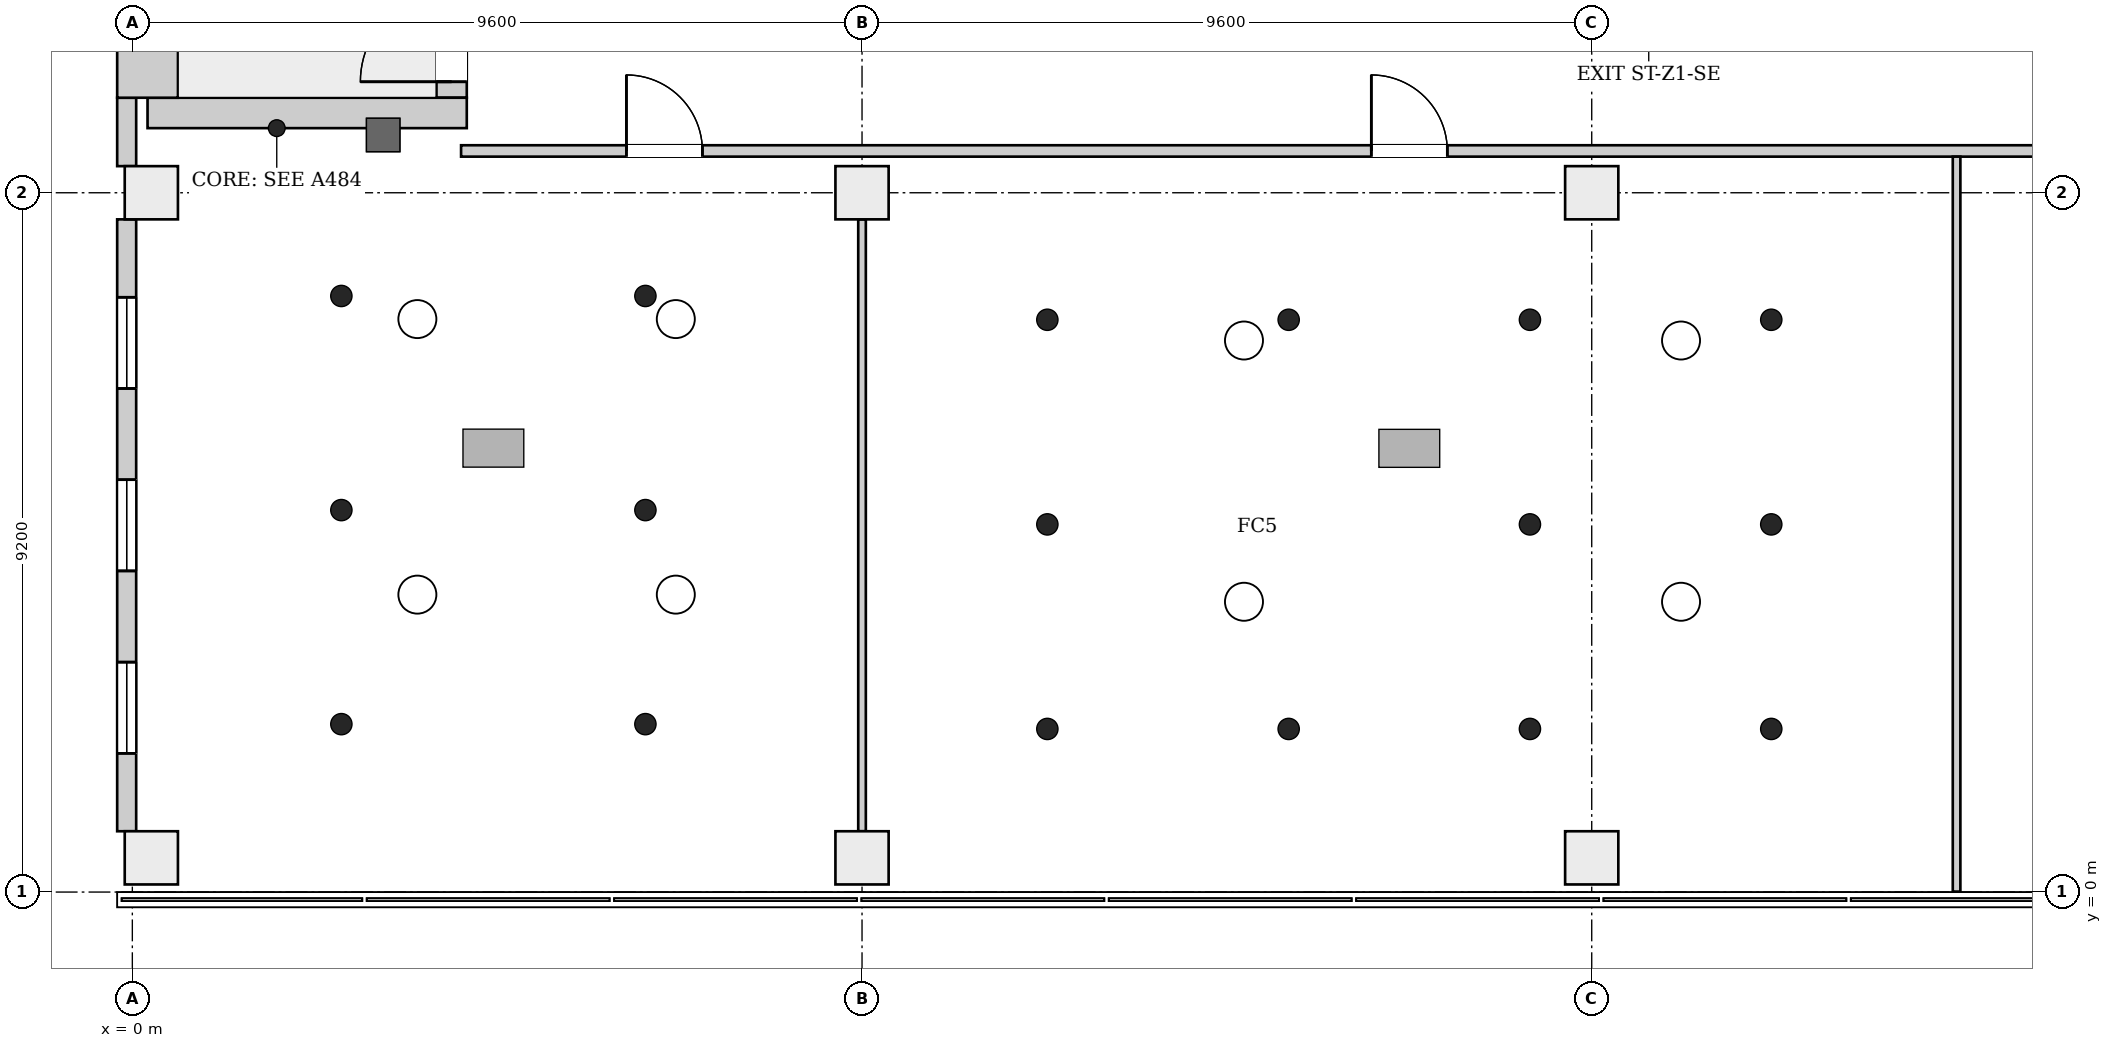
"""IFC4 building model, lengths in metres.
Left out: names, types, materials, properties, quantities, classifications, styles, units other than length and angle.
Written with IfcOpenShell. Run it as: python <this file> out.ifc"""

import sys

from ifc_helpers import new_model, si_unit, direction, frame, frame_2d, origin, origin_2d, place, context, subcontext, project, spatial, rectangle, extrude, element, fill, save


model = new_model("IFC4")
c1 = context("Model", 3, precision=1e-05, world=origin(), true_north=direction((0.0, 1.0)))
c2 = subcontext(c1, "Body", "Model", "MODEL_VIEW")
j1 = project(units=[si_unit("LENGTHUNIT", "METRE"), si_unit("PLANEANGLEUNIT", "RADIAN")], contexts=[c1])
p1 = place(None, origin())
s1 = spatial("IfcSite", under=j1, at=p1, CompositionType="ELEMENT")
p2 = place(p1, origin())
s2 = spatial("IfcBuilding", under=s1, at=p2, CompositionType="ELEMENT")
p3 = place(p2, frame((0.0, 0.0, 69.7)))
s3 = spatial("IfcBuildingStorey", under=s2, at=p3, CompositionType="ELEMENT", Elevation=69.7)
p4 = place(p3, frame((0.2, 10.25, 0.0), z_axis=(0.0, 0.0, 1.0), x_axis=(1.0, 0.0, 0.0)))
e1 = element("IfcWall", 1, at=p4, inside=s3, PredefinedType="SHEAR", context=c2, shape_type="SweptSolid", body=[
    extrude(rectangle(XDim=4.2, YDim=0.4, at=frame_2d((2.1, 0.0))), origin(), (0.0, 0.0, 1.0), 4.2),
])
p5 = place(p3, frame((0.2, 10.45, 0.0), z_axis=(0.0, 0.0, 1.0), x_axis=(0.0, 1.0, 0.0)))
e2 = element("IfcWall", 2, at=p5, inside=s3, PredefinedType="SHEAR", context=c2, shape_type="SweptSolid", body=[
    extrude(rectangle(XDim=6.6, YDim=0.8, at=frame_2d((3.3, 0.0))), origin(), (0.0, 0.0, 1.0), 4.2),
])
p6 = place(p3, frame((4.2, 10.45, 0.0), z_axis=(0.0, 0.0, 1.0), x_axis=(0.0, 1.0, 0.0)))
e3 = element("IfcWall", 3, at=p6, inside=s3, PredefinedType="SHEAR", context=c2, shape_type="SweptSolid", body=[
    extrude(rectangle(XDim=6.6, YDim=0.4, at=frame_2d((3.3, 0.0))), origin(), (0.0, 0.0, 1.0), 4.2),
])
p7 = place(p6, frame((0.21, 0.0, 0.0)))
e4 = element("IfcOpeningElement", 4, at=p7, cuts=e3, PredefinedType="OPENING", context=c2, shape_type="SweptSolid", body=[
    extrude(rectangle(XDim=1.2, YDim=2.1, at=frame_2d((0.6, 1.05))), frame((0.0, 0.21, 0.0), z_axis=(0.0, -1.0, 0.0), x_axis=(1.0, 0.0, 0.0)), (0.0, 0.0, 1.0), 0.42),
])
for number, where, z_axis, x_axis in (
    (5, (0.25, 0.45, 0.0), (0.0, 0.0, 1.0), (1.0, 0.0, 0.0)),
    (6, (9.6, 0.45, 0.0), (0.0, 0.0, 1.0), (1.0, 0.0, 0.0)),
    (7, (19.2, 0.45, 0.0), (0.0, 0.0, 1.0), (1.0, 0.0, 0.0)),
    (8, (0.25, 9.2, 0.0), (0.0, 0.0, 1.0), (1.0, 0.0, 0.0)),
    (9, (9.6, 9.2, 0.0), (0.0, 0.0, 1.0), (1.0, 0.0, 0.0)),
    (10, (19.2, 9.2, 0.0), (0.0, 0.0, 1.0), (1.0, 0.0, 0.0)),
):
    element("IfcColumn", number, at=place(p3, frame(where, z_axis=z_axis, x_axis=x_axis)), inside=s3, PredefinedType="COLUMN", context=c2, shape_type="SweptSolid", body=[
        extrude(rectangle(XDim=0.7, YDim=0.7, at=origin_2d()), origin(), (0.0, 0.0, 1.0), 4.2),
    ])
p8 = place(p3, frame((-0.074, 8.85, 0.0), z_axis=(0.0, 0.0, 1.0), x_axis=(0.0, -1.0, 0.0)))
e11 = element("IfcWall", 11, at=p8, inside=s3, PredefinedType="ELEMENTEDWALL", context=c2, shape_type="SweptSolid", body=[
    extrude(rectangle(XDim=8.05, YDim=0.25, at=frame_2d((4.025, 0.0))), origin(), (0.0, 0.0, 1.0), 3.9),
])
p9 = place(p8, frame((5.825, 0.0, 0.9)))
e12 = element("IfcOpeningElement", 12, at=p9, cuts=e11, PredefinedType="OPENING", context=c2, shape_type="SweptSolid", body=[
    extrude(rectangle(XDim=1.2, YDim=2.6, at=frame_2d((0.6, 1.3))), frame((0.0, 0.135, 0.0), z_axis=(0.0, -1.0, 0.0), x_axis=(1.0, 0.0, 0.0)), (0.0, 0.0, 1.0), 0.27),
])
p10 = place(p8, frame((3.425, 0.0, 0.9)))
e13 = element("IfcOpeningElement", 13, at=p10, cuts=e11, PredefinedType="OPENING", context=c2, shape_type="SweptSolid", body=[
    extrude(rectangle(XDim=1.2, YDim=2.6, at=frame_2d((0.6, 1.3))), frame((0.0, 0.135, 0.0), z_axis=(0.0, -1.0, 0.0), x_axis=(1.0, 0.0, 0.0)), (0.0, 0.0, 1.0), 0.27),
])
p11 = place(p8, frame((1.025, 0.0, 0.9)))
e14 = element("IfcOpeningElement", 14, at=p11, cuts=e11, PredefinedType="OPENING", context=c2, shape_type="SweptSolid", body=[
    extrude(rectangle(XDim=1.2, YDim=2.6, at=frame_2d((0.6, 1.3))), frame((0.0, 0.135, 0.0), z_axis=(0.0, -1.0, 0.0), x_axis=(1.0, 0.0, 0.0)), (0.0, 0.0, 1.0), 0.27),
])
p12 = place(p3, frame((-0.074, 10.45, 0.0), z_axis=(0.0, 0.0, 1.0), x_axis=(0.0, -1.0, 0.0)))
e15 = element("IfcWall", 15, at=p12, inside=s3, PredefinedType="ELEMENTEDWALL", context=c2, shape_type="SweptSolid", body=[
    extrude(rectangle(XDim=0.9, YDim=0.25, at=frame_2d((0.45, 0.0))), origin(), (0.0, 0.0, 1.0), 3.9),
])
p13 = place(p3, frame((4.325, 9.75, 0.0), z_axis=(0.0, 0.0, 1.0), x_axis=(1.0, 0.0, 0.0)))
e16 = element("IfcWall", 16, at=p13, inside=s3, PredefinedType="PARTITIONING", context=c2, shape_type="SweptSolid", body=[
    extrude(rectangle(XDim=34.369, YDim=0.15, at=frame_2d((17.185, 0.0))), origin(), (0.0, 0.0, 1.0), 3.9),
])
p14 = place(p13, frame((2.175, 0.0, 0.0)))
e17 = element("IfcOpeningElement", 17, at=p14, cuts=e16, PredefinedType="OPENING", context=c2, shape_type="SweptSolid", body=[
    extrude(rectangle(XDim=1.0, YDim=2.1, at=frame_2d((0.5, 1.05))), frame((0.0, 0.085, 0.0), z_axis=(0.0, -1.0, 0.0), x_axis=(1.0, 0.0, 0.0)), (0.0, 0.0, 1.0), 0.17),
])
p15 = place(p13, frame((11.975, 0.0, 0.0)))
e18 = element("IfcOpeningElement", 18, at=p15, cuts=e16, PredefinedType="OPENING", context=c2, shape_type="SweptSolid", body=[
    extrude(rectangle(XDim=1.0, YDim=2.1, at=frame_2d((0.5, 1.05))), frame((0.0, 0.085, 0.0), z_axis=(0.0, -1.0, 0.0), x_axis=(1.0, 0.0, 0.0)), (0.0, 0.0, 1.0), 0.17),
])
p16 = place(p13, frame((21.575, 0.0, 0.0)))
e19 = element("IfcOpeningElement", 19, at=p16, cuts=e16, PredefinedType="OPENING", context=c2, shape_type="SweptSolid", body=[
    extrude(rectangle(XDim=1.0, YDim=2.1, at=frame_2d((0.5, 1.05))), frame((0.0, 0.085, 0.0), z_axis=(0.0, -1.0, 0.0), x_axis=(1.0, 0.0, 0.0)), (0.0, 0.0, 1.0), 0.17),
])
p17 = place(p13, frame((28.925, 0.0, 0.0)))
e20 = element("IfcOpeningElement", 20, at=p17, cuts=e16, PredefinedType="OPENING", context=c2, shape_type="SweptSolid", body=[
    extrude(rectangle(XDim=1.0, YDim=2.1, at=frame_2d((0.5, 1.05))), frame((0.0, 0.085, 0.0), z_axis=(0.0, -1.0, 0.0), x_axis=(1.0, 0.0, 0.0)), (0.0, 0.0, 1.0), 0.17),
])
p18 = place(p3, frame((9.6, 0.8, 0.0), z_axis=(0.0, 0.0, 1.0), x_axis=(0.0, 1.0, 0.0)))
e21 = element("IfcWall", 21, at=p18, inside=s3, PredefinedType="PARTITIONING", context=c2, shape_type="SweptSolid", body=[
    extrude(rectangle(XDim=8.05, YDim=0.1, at=frame_2d((4.025, 0.0))), origin(), (0.0, 0.0, 1.0), 3.9),
])
p19 = place(p3, frame((24.0, 0.006, 0.0), z_axis=(0.0, 0.0, 1.0), x_axis=(0.0, 1.0, 0.0)))
e22 = element("IfcWall", 22, at=p19, inside=s3, PredefinedType="PARTITIONING", context=c2, shape_type="SweptSolid", body=[
    extrude(rectangle(XDim=9.669, YDim=0.1, at=frame_2d((4.834, 0.0))), origin(), (0.0, 0.0, 1.0), 3.9),
])
p20 = place(p9, origin())
e23 = element("IfcWindow", 23, at=p20, inside=s3, PartitioningType="SINGLE_PANEL", PredefinedType="WINDOW", context=c2, shape_type="SweptSolid", body=[
    extrude(rectangle(XDim=1.2, YDim=2.6, at=frame_2d((0.6, 1.3))), frame((0.0, 0.03, 0.0), z_axis=(0.0, -1.0, 0.0), x_axis=(1.0, 0.0, 0.0)), (0.0, 0.0, 1.0), 0.06),
])
fill(e12, e23)
p21 = place(p10, origin())
e24 = element("IfcWindow", 24, at=p21, inside=s3, PartitioningType="SINGLE_PANEL", PredefinedType="WINDOW", context=c2, shape_type="SweptSolid", body=[
    extrude(rectangle(XDim=1.2, YDim=2.6, at=frame_2d((0.6, 1.3))), frame((0.0, 0.03, 0.0), z_axis=(0.0, -1.0, 0.0), x_axis=(1.0, 0.0, 0.0)), (0.0, 0.0, 1.0), 0.06),
])
fill(e13, e24)
p22 = place(p11, origin())
e25 = element("IfcWindow", 25, at=p22, inside=s3, PartitioningType="SINGLE_PANEL", PredefinedType="WINDOW", context=c2, shape_type="SweptSolid", body=[
    extrude(rectangle(XDim=1.2, YDim=2.6, at=frame_2d((0.6, 1.3))), frame((0.0, 0.03, 0.0), z_axis=(0.0, -1.0, 0.0), x_axis=(1.0, 0.0, 0.0)), (0.0, 0.0, 1.0), 0.06),
])
fill(e14, e25)
p23 = place(p7, origin())
e26 = element("IfcDoor", 26, at=p23, inside=s3, OperationType="SINGLE_SWING_RIGHT", PredefinedType="DOOR", context=c2, shape_type="SweptSolid", body=[
    extrude(rectangle(XDim=1.2, YDim=2.1, at=frame_2d((0.6, 1.05))), frame((0.0, 0.025, 0.0), z_axis=(0.0, -1.0, 0.0), x_axis=(1.0, 0.0, 0.0)), (0.0, 0.0, 1.0), 0.05),
])
fill(e4, e26)
p24 = place(p14, origin())
e27 = element("IfcDoor", 27, at=p24, inside=s3, OperationType="SINGLE_SWING_RIGHT", PredefinedType="DOOR", context=c2, shape_type="SweptSolid", body=[
    extrude(rectangle(XDim=1.0, YDim=2.1, at=frame_2d((0.5, 1.05))), frame((0.0, 0.025, 0.0), z_axis=(0.0, -1.0, 0.0), x_axis=(1.0, 0.0, 0.0)), (0.0, 0.0, 1.0), 0.05),
])
fill(e17, e27)
p25 = place(p15, origin())
e28 = element("IfcDoor", 28, at=p25, inside=s3, OperationType="SINGLE_SWING_RIGHT", PredefinedType="DOOR", context=c2, shape_type="SweptSolid", body=[
    extrude(rectangle(XDim=1.0, YDim=2.1, at=frame_2d((0.5, 1.05))), frame((0.0, 0.025, 0.0), z_axis=(0.0, -1.0, 0.0), x_axis=(1.0, 0.0, 0.0)), (0.0, 0.0, 1.0), 0.05),
])
fill(e18, e28)
save(model, sys.argv[1])
